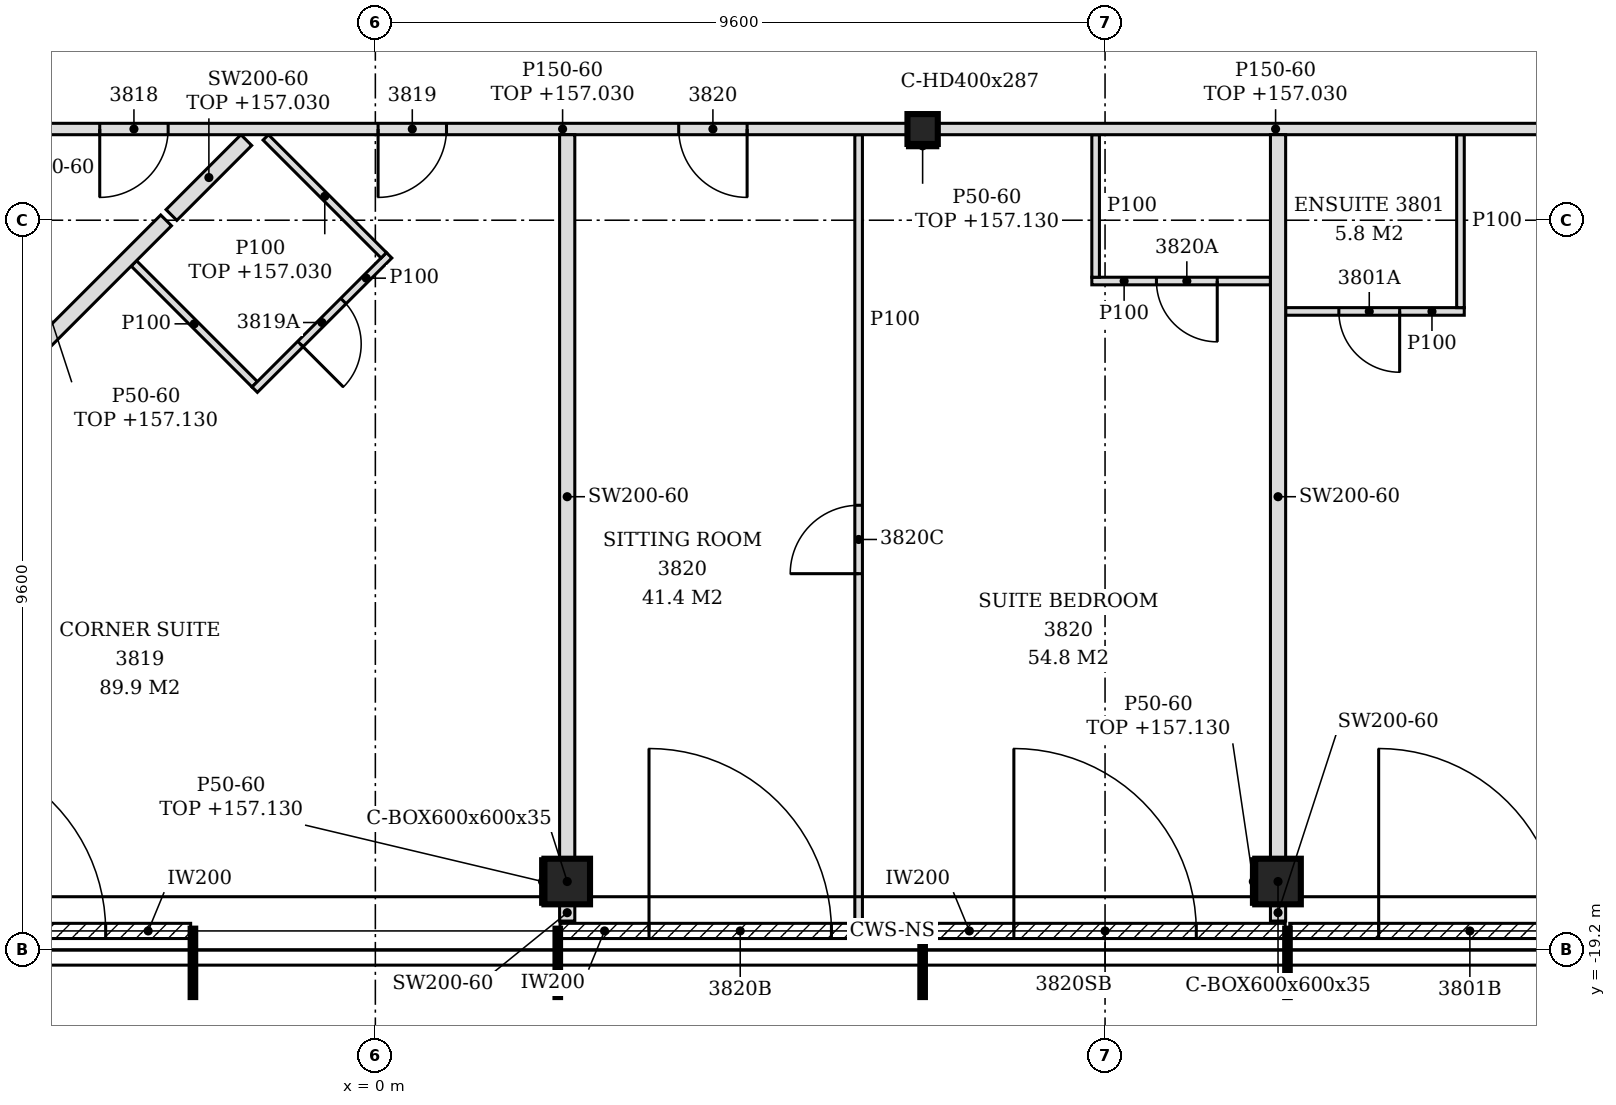
"""IFC4 building model, lengths in metres.
Left out: names, types, materials, properties, quantities, classifications, styles, units other than length and angle.
Written with IfcOpenShell. Run it as: python <this file> out.ifc"""

import sys

from ifc_helpers import new_model, si_unit, direction, frame, frame_2d, origin, origin_2d, place, context, subcontext, project, spatial, polyline, rectangle, hollow_rectangle, i_section, outline, extrude, element, fill, save


model = new_model("IFC4")
c1 = context("Model", 3, precision=1e-05, world=origin(), true_north=direction((0.0, 1.0)))
c2 = subcontext(c1, "Body", "Model", "MODEL_VIEW")
j1 = project(units=[si_unit("LENGTHUNIT", "METRE"), si_unit("PLANEANGLEUNIT", "RADIAN")], contexts=[c1])
p1 = place(None, origin())
s1 = spatial("IfcSite", under=j1, at=p1, CompositionType="ELEMENT")
p2 = place(p1, origin())
s2 = spatial("IfcBuilding", under=s1, at=p2, CompositionType="ELEMENT")
p3 = place(p2, frame((0.0, 0.0, 154.2)))
s3 = spatial("IfcBuildingStorey", under=s2, at=p3, CompositionType="ELEMENT", Elevation=154.2)
for number, where, z_axis, x_axis in (
    (1, (2.524, -18.3, -0.15), (0.0, 0.0, 1.0), (1.0, 0.0, 0.0)),
    (2, (11.876, -18.3, -0.15), (0.0, 0.0, 1.0), (1.0, 0.0, 0.0)),
):
    element("IfcColumn", number, at=place(p3, frame(where, z_axis=z_axis, x_axis=x_axis)), inside=s3, PredefinedType="COLUMN", context=c2, shape_type="SweptSolid", body=[
        extrude(hollow_rectangle(XDim=0.6, YDim=0.6, WallThickness=0.035, at=origin_2d()), origin(), (0.0, 0.0, 1.0), 3.6),
    ])
p4 = place(p3, frame((7.2, -8.4, -0.15), z_axis=(0.0, 0.0, 1.0), x_axis=(1.0, 0.0, 0.0)))
e3 = element("IfcColumn", 3, at=p4, inside=s3, PredefinedType="COLUMN", context=c2, shape_type="SweptSolid", body=[
    extrude(i_section(OverallWidth=0.399, OverallDepth=0.393, WebThickness=0.023, FlangeThickness=0.037, FilletRadius=0.015, at=origin_2d()), origin(), (0.0, 0.0, 1.0), 3.6),
])
p5 = place(p3, frame((-7.056, -18.95, 0.0), z_axis=(0.0, 0.0, 1.0), x_axis=(1.0, 0.0, 0.0)))
e4 = element("IfcWall", 4, at=p5, inside=s3, PredefinedType="NOTDEFINED", context=c2, shape_type="SweptSolid", body=[
    extrude(rectangle(XDim=4.626, YDim=0.2, at=frame_2d((2.313, 0.0))), origin(), (0.0, 0.0, 1.0), 3.45),
])
p6 = place(p5, frame((1.108, 0.0, 0.0)))
e5 = element("IfcOpeningElement", 5, at=p6, cuts=e4, PredefinedType="OPENING", context=c2, shape_type="SweptSolid", body=[
    extrude(rectangle(XDim=2.4, YDim=2.4, at=frame_2d((1.2, 1.2))), frame((0.0, 0.11, 0.0), z_axis=(0.0, -1.0, 0.0), x_axis=(1.0, 0.0, 0.0)), (0.0, 0.0, 1.0), 0.22),
])
p7 = place(p3, frame((2.43, -18.95, 0.0), z_axis=(0.0, 0.0, 1.0), x_axis=(1.0, 0.0, 0.0)))
e6 = element("IfcWall", 6, at=p7, inside=s3, PredefinedType="NOTDEFINED", context=c2, shape_type="SweptSolid", body=[
    extrude(rectangle(XDim=4.74, YDim=0.2, at=frame_2d((2.37, 0.0))), origin(), (0.0, 0.0, 1.0), 3.45),
])
p8 = place(p7, frame((1.17, 0.0, 0.0)))
e7 = element("IfcOpeningElement", 7, at=p8, cuts=e6, PredefinedType="OPENING", context=c2, shape_type="SweptSolid", body=[
    extrude(rectangle(XDim=2.4, YDim=2.4, at=frame_2d((1.2, 1.2))), frame((0.0, 0.11, 0.0), z_axis=(0.0, -1.0, 0.0), x_axis=(1.0, 0.0, 0.0)), (0.0, 0.0, 1.0), 0.22),
])
p9 = place(p3, frame((7.23, -18.95, 0.0), z_axis=(0.0, 0.0, 1.0), x_axis=(1.0, 0.0, 0.0)))
e8 = element("IfcWall", 8, at=p9, inside=s3, PredefinedType="NOTDEFINED", context=c2, shape_type="SweptSolid", body=[
    extrude(rectangle(XDim=4.74, YDim=0.2, at=frame_2d((2.37, 0.0))), origin(), (0.0, 0.0, 1.0), 3.45),
])
p10 = place(p9, frame((1.17, 0.0, 0.0)))
e9 = element("IfcOpeningElement", 9, at=p10, cuts=e8, PredefinedType="OPENING", context=c2, shape_type="SweptSolid", body=[
    extrude(rectangle(XDim=2.4, YDim=2.4, at=frame_2d((1.2, 1.2))), frame((0.0, 0.11, 0.0), z_axis=(0.0, -1.0, 0.0), x_axis=(1.0, 0.0, 0.0)), (0.0, 0.0, 1.0), 0.22),
])
p11 = place(p3, frame((12.03, -18.95, 0.0), z_axis=(0.0, 0.0, 1.0), x_axis=(1.0, 0.0, 0.0)))
e10 = element("IfcWall", 10, at=p11, inside=s3, PredefinedType="NOTDEFINED", context=c2, shape_type="SweptSolid", body=[
    extrude(rectangle(XDim=4.74, YDim=0.2, at=frame_2d((2.37, 0.0))), origin(), (0.0, 0.0, 1.0), 3.45),
])
p12 = place(p11, frame((1.17, 0.0, 0.0)))
e11 = element("IfcOpeningElement", 11, at=p12, cuts=e10, PredefinedType="OPENING", context=c2, shape_type="SweptSolid", body=[
    extrude(rectangle(XDim=2.4, YDim=2.4, at=frame_2d((1.2, 1.2))), frame((0.0, 0.11, 0.0), z_axis=(0.0, -1.0, 0.0), x_axis=(1.0, 0.0, 0.0)), (0.0, 0.0, 1.0), 0.22),
])
p13 = place(p3, frame((2.524, -18.82, 0.0), z_axis=(0.0, 0.0, 1.0), x_axis=(0.0, 1.0, 0.0)))
e12 = element("IfcWall", 12, at=p13, inside=s3, PredefinedType="PARTITIONING", context=c2, shape_type="SweptSolid", body=[
    extrude(rectangle(XDim=0.22, YDim=0.2, at=frame_2d((0.11, 0.0))), origin(), (0.0, 0.0, 1.0), 3.45),
])
p14 = place(p3, frame((6.358, -18.82, 0.0), z_axis=(0.0, 0.0, 1.0), x_axis=(0.0, 1.0, 0.0)))
e13 = element("IfcWall", 13, at=p14, inside=s3, PredefinedType="PARTITIONING", context=c2, shape_type="SweptSolid", body=[
    extrude(outline(polyline([(0.0, 0.0), (10.345, 0.0), (10.345, 2.83), (10.27, 2.83), (10.268, 3.45), (4.525, 3.45), (4.523, 2.88), (4.315, 2.88), (4.313, 3.45), (0.67, 3.45), (0.668, 2.93), (0.37, 2.93), (0.368, 3.45), (0.0, 3.45), (0.0, 0.0)])), frame((0.0, 0.05, 0.0), z_axis=(0.0, -1.0, 0.0), x_axis=(1.0, 0.0, 0.0)), (0.0, 0.0, 1.0), 0.1),
])
p15 = place(p14, frame((4.57, 0.0, 0.0)))
e14 = element("IfcOpeningElement", 14, at=p15, cuts=e13, PredefinedType="OPENING", context=c2, shape_type="SweptSolid", body=[
    extrude(rectangle(XDim=0.9, YDim=2.1, at=frame_2d((0.45, 1.05))), frame((0.0, 0.06, 0.0), z_axis=(0.0, -1.0, 0.0), x_axis=(1.0, 0.0, 0.0)), (0.0, 0.0, 1.0), 0.12),
])
p16 = place(p3, frame((11.876, -18.82, 0.0), z_axis=(0.0, 0.0, 1.0), x_axis=(0.0, 1.0, 0.0)))
e15 = element("IfcWall", 15, at=p16, inside=s3, PredefinedType="PARTITIONING", context=c2, shape_type="SweptSolid", body=[
    extrude(rectangle(XDim=0.22, YDim=0.2, at=frame_2d((0.11, 0.0))), origin(), (0.0, 0.0, 1.0), 3.45),
])
for number, where, z_axis, x_axis in (
    (16, (2.524, -18.0, 0.0), (0.0, 0.0, 1.0), (0.0, 1.0, 0.0)),
    (17, (11.876, -18.0, 0.0), (0.0, 0.0, 1.0), (0.0, 1.0, 0.0)),
):
    element("IfcWall", number, at=place(p3, frame(where, z_axis=z_axis, x_axis=x_axis)), inside=s3, PredefinedType="PARTITIONING", context=c2, shape_type="SweptSolid", body=[
        extrude(outline(polyline([(0.0, 0.0), (9.525, 0.0), (9.525, 2.83), (9.45, 2.83), (9.448, 3.45), (3.705, 3.45), (3.703, 2.88), (3.495, 2.88), (3.493, 3.45), (0.0, 3.45), (0.0, 0.0)])), frame((0.0, 0.1, 0.0), z_axis=(0.0, -1.0, 0.0), x_axis=(1.0, 0.0, 0.0)), (0.0, 0.0, 1.0), 0.2),
    ])
p17 = place(p3, frame((-9.507, -16.355, 0.0), z_axis=(0.0, 0.0, 1.0), x_axis=(0.707170680804, 0.707042875794, 0.0)))
e18 = element("IfcWall", 18, at=p17, inside=s3, PredefinedType="PARTITIONING", context=c2, shape_type="SweptSolid", body=[
    extrude(rectangle(XDim=9.551, YDim=0.2, at=frame_2d((4.776, 0.0))), origin(), (0.0, 0.0, 1.0), 2.93),
])
p18 = place(p3, frame((-1.587, -11.759, 0.0), z_axis=(0.0, 0.0, 1.0), x_axis=(-0.706889644159, 0.707323851557, 0.0)))
e19 = element("IfcWall", 19, at=p18, inside=s3, PredefinedType="PARTITIONING", context=c2, shape_type="SweptSolid", body=[
    extrude(rectangle(XDim=2.249, YDim=0.1, at=frame_2d((1.125, 0.0))), origin(), (0.0, 0.0, 1.0), 3.45),
])
p19 = place(p3, frame((-1.587, -11.829, 0.0), z_axis=(0.0, 0.0, 1.0), x_axis=(0.707350821469, 0.706862656651, 0.0)))
e20 = element("IfcWall", 20, at=p19, inside=s3, PredefinedType="PARTITIONING", context=c2, shape_type="SweptSolid", body=[
    extrude(rectangle(XDim=2.5, YDim=0.1, at=frame_2d((1.25, 0.0))), origin(), (0.0, 0.0, 1.0), 3.45),
])
p20 = place(p19, frame((0.85, 0.0, 0.0)))
e21 = element("IfcOpeningElement", 21, at=p20, cuts=e20, PredefinedType="OPENING", context=c2, shape_type="SweptSolid", body=[
    extrude(rectangle(XDim=0.8, YDim=2.1, at=frame_2d((0.4, 1.05))), frame((0.0, 0.06, 0.0), z_axis=(0.0, -1.0, 0.0), x_axis=(1.0, 0.0, 0.0)), (0.0, 0.0, 1.0), 0.12),
])
p21 = place(p3, frame((11.976, -10.8, 0.0), z_axis=(0.0, 0.0, 1.0), x_axis=(1.0, 0.0, 0.0)))
e22 = element("IfcWall", 22, at=p21, inside=s3, PredefinedType="PARTITIONING", context=c2, shape_type="SweptSolid", body=[
    extrude(rectangle(XDim=2.35, YDim=0.1, at=frame_2d((1.175, 0.0))), origin(), (0.0, 0.0, 1.0), 3.45),
])
p22 = place(p21, frame((0.7, 0.0, 0.0)))
e23 = element("IfcOpeningElement", 23, at=p22, cuts=e22, PredefinedType="OPENING", context=c2, shape_type="SweptSolid", body=[
    extrude(rectangle(XDim=0.8, YDim=2.1, at=frame_2d((0.4, 1.05))), frame((0.0, 0.06, 0.0), z_axis=(0.0, -1.0, 0.0), x_axis=(1.0, 0.0, 0.0)), (0.0, 0.0, 1.0), 0.12),
])
p23 = place(p3, frame((14.276, -10.75, 0.0), z_axis=(0.0, 0.0, 1.0), x_axis=(0.0, 1.0, 0.0)))
e24 = element("IfcWall", 24, at=p23, inside=s3, PredefinedType="PARTITIONING", context=c2, shape_type="SweptSolid", body=[
    extrude(outline(polyline([(0.0, 0.0), (2.275, 0.0), (2.275, 2.83), (2.2, 2.83), (2.198, 3.45), (0.0, 3.45), (0.0, 0.0)])), frame((0.0, 0.05, 0.0), z_axis=(0.0, -1.0, 0.0), x_axis=(1.0, 0.0, 0.0)), (0.0, 0.0, 1.0), 0.1),
])
p24 = place(p3, frame((9.426, -10.4, 0.0), z_axis=(0.0, 0.0, 1.0), x_axis=(1.0, 0.0, 0.0)))
e25 = element("IfcWall", 25, at=p24, inside=s3, PredefinedType="PARTITIONING", context=c2, shape_type="SweptSolid", body=[
    extrude(rectangle(XDim=2.35, YDim=0.1, at=frame_2d((1.175, 0.0))), origin(), (0.0, 0.0, 1.0), 3.45),
])
p25 = place(p24, frame((0.85, 0.0, 0.0)))
e26 = element("IfcOpeningElement", 26, at=p25, cuts=e25, PredefinedType="OPENING", context=c2, shape_type="SweptSolid", body=[
    extrude(rectangle(XDim=0.8, YDim=2.1, at=frame_2d((0.4, 1.05))), frame((0.0, 0.06, 0.0), z_axis=(0.0, -1.0, 0.0), x_axis=(1.0, 0.0, 0.0)), (0.0, 0.0, 1.0), 0.12),
])
p26 = place(p3, frame((9.476, -10.35, 0.0), z_axis=(0.0, 0.0, 1.0), x_axis=(0.0, 1.0, 0.0)))
e27 = element("IfcWall", 27, at=p26, inside=s3, PredefinedType="PARTITIONING", context=c2, shape_type="SweptSolid", body=[
    extrude(outline(polyline([(0.0, 0.0), (1.875, 0.0), (1.875, 2.83), (1.8, 2.83), (1.798, 3.45), (0.0, 3.45), (0.0, 0.0)])), frame((0.0, 0.05, 0.0), z_axis=(0.0, -1.0, 0.0), x_axis=(1.0, 0.0, 0.0)), (0.0, 0.0, 1.0), 0.1),
])
p27 = place(p3, frame((0.111, -10.062, 0.0), z_axis=(0.0, 0.0, 1.0), x_axis=(-0.70732924673, 0.706884245631, 0.0)))
e28 = element("IfcWall", 28, at=p27, inside=s3, PredefinedType="PARTITIONING", context=c2, shape_type="SweptSolid", body=[
    extrude(rectangle(XDim=2.195, YDim=0.1, at=frame_2d((1.097, 0.0))), origin(), (0.0, 0.0, 1.0), 2.83),
])
p28 = place(p3, frame((-2.683, -9.531, 0.0), z_axis=(0.0, 0.0, 1.0), x_axis=(0.707019164958, 0.70719438656, 0.0)))
e29 = element("IfcWall", 29, at=p28, inside=s3, PredefinedType="PARTITIONING", context=c2, shape_type="SweptSolid", body=[
    extrude(rectangle(XDim=1.393, YDim=0.2, at=frame_2d((0.697, 0.0))), origin(), (0.0, 0.0, 1.0), 2.83),
])
p29 = place(p3, frame((-4.601, -8.4, 0.0), z_axis=(0.0, 0.0, 1.0), x_axis=(1.0, 0.0, 0.0)))
e30 = element("IfcWall", 30, at=p29, inside=s3, PredefinedType="PARTITIONING", context=c2, shape_type="SweptSolid", body=[
    extrude(rectangle(XDim=11.601, YDim=0.15, at=frame_2d((5.801, 0.0))), origin(), (0.0, 0.0, 1.0), 2.83),
])
p30 = place(p29, frame((0.974, 0.0, 0.0)))
e31 = element("IfcOpeningElement", 31, at=p30, cuts=e30, PredefinedType="OPENING", context=c2, shape_type="SweptSolid", body=[
    extrude(rectangle(XDim=0.9, YDim=2.1, at=frame_2d((0.45, 1.05))), frame((0.0, 0.085, 0.0), z_axis=(0.0, -1.0, 0.0), x_axis=(1.0, 0.0, 0.0)), (0.0, 0.0, 1.0), 0.17),
])
p31 = place(p29, frame((4.636, 0.0, 0.0)))
e32 = element("IfcOpeningElement", 32, at=p31, cuts=e30, PredefinedType="OPENING", context=c2, shape_type="SweptSolid", body=[
    extrude(rectangle(XDim=0.9, YDim=2.1, at=frame_2d((0.45, 1.05))), frame((0.0, 0.085, 0.0), z_axis=(0.0, -1.0, 0.0), x_axis=(1.0, 0.0, 0.0)), (0.0, 0.0, 1.0), 0.17),
])
p32 = place(p29, frame((8.592, 0.0, 0.0)))
e33 = element("IfcOpeningElement", 33, at=p32, cuts=e30, PredefinedType="OPENING", context=c2, shape_type="SweptSolid", body=[
    extrude(rectangle(XDim=0.9, YDim=2.1, at=frame_2d((0.45, 1.05))), frame((0.0, 0.085, 0.0), z_axis=(0.0, -1.0, 0.0), x_axis=(1.0, 0.0, 0.0)), (0.0, 0.0, 1.0), 0.17),
])
p33 = place(p3, frame((7.399, -8.4, 0.0), z_axis=(0.0, 0.0, 1.0), x_axis=(1.0, 0.0, 0.0)))
e34 = element("IfcWall", 34, at=p33, inside=s3, PredefinedType="PARTITIONING", context=c2, shape_type="SweptSolid", body=[
    extrude(rectangle(XDim=11.601, YDim=0.15, at=frame_2d((5.801, 0.0))), origin(), (0.0, 0.0, 1.0), 2.83),
])
p34 = place(p33, frame((8.888, 0.0, 0.0)))
e35 = element("IfcOpeningElement", 35, at=p34, cuts=e34, PredefinedType="OPENING", context=c2, shape_type="SweptSolid", body=[
    extrude(rectangle(XDim=0.9, YDim=2.1, at=frame_2d((0.45, 1.05))), frame((0.0, 0.085, 0.0), z_axis=(0.0, -1.0, 0.0), x_axis=(1.0, 0.0, 0.0)), (0.0, 0.0, 1.0), 0.17),
])
for number, where, z_axis, x_axis in (
    (36, (2.199, -18.6, 0.0), (0.0, 0.0, 1.0), (0.0, 1.0, 0.0)),
    (37, (11.551, -18.6, 0.0), (0.0, 0.0, 1.0), (0.0, 1.0, 0.0)),
):
    element("IfcWall", number, at=place(p3, frame(where, z_axis=z_axis, x_axis=x_axis)), inside=s3, PredefinedType="PARTITIONING", context=c2, shape_type="SweptSolid", body=[
        extrude(rectangle(XDim=0.6, YDim=0.05, at=frame_2d((0.3, 0.0))), origin(), (0.0, 0.0, 1.0), 2.93),
    ])
p35 = place(p3, frame((7.0, -8.622, 0.0), z_axis=(0.0, 0.0, 1.0), x_axis=(1.0, 0.0, 0.0)))
e38 = element("IfcWall", 38, at=p35, inside=s3, PredefinedType="PARTITIONING", context=c2, shape_type="SweptSolid", body=[
    extrude(rectangle(XDim=0.399, YDim=0.05, at=frame_2d((0.199, 0.0))), origin(), (0.0, 0.0, 1.0), 2.93),
])
p36 = place(p6, origin())
e39 = element("IfcDoor", 39, at=p36, inside=s3, OperationType="SINGLE_SWING_LEFT", PredefinedType="DOOR", context=c2, shape_type="SweptSolid", body=[
    extrude(rectangle(XDim=2.4, YDim=2.4, at=frame_2d((1.2, 1.2))), frame((0.0, 0.025, 0.0), z_axis=(0.0, -1.0, 0.0), x_axis=(1.0, 0.0, 0.0)), (0.0, 0.0, 1.0), 0.05),
])
fill(e5, e39)
p37 = place(p8, origin())
e40 = element("IfcDoor", 40, at=p37, inside=s3, OperationType="SINGLE_SWING_LEFT", PredefinedType="DOOR", context=c2, shape_type="SweptSolid", body=[
    extrude(rectangle(XDim=2.4, YDim=2.4, at=frame_2d((1.2, 1.2))), frame((0.0, 0.025, 0.0), z_axis=(0.0, -1.0, 0.0), x_axis=(1.0, 0.0, 0.0)), (0.0, 0.0, 1.0), 0.05),
])
fill(e7, e40)
p38 = place(p10, origin())
e41 = element("IfcDoor", 41, at=p38, inside=s3, OperationType="SINGLE_SWING_LEFT", PredefinedType="DOOR", context=c2, shape_type="SweptSolid", body=[
    extrude(rectangle(XDim=2.4, YDim=2.4, at=frame_2d((1.2, 1.2))), frame((0.0, 0.025, 0.0), z_axis=(0.0, -1.0, 0.0), x_axis=(1.0, 0.0, 0.0)), (0.0, 0.0, 1.0), 0.05),
])
fill(e9, e41)
p39 = place(p12, origin())
e42 = element("IfcDoor", 42, at=p39, inside=s3, OperationType="SINGLE_SWING_LEFT", PredefinedType="DOOR", context=c2, shape_type="SweptSolid", body=[
    extrude(rectangle(XDim=2.4, YDim=2.4, at=frame_2d((1.2, 1.2))), frame((0.0, 0.025, 0.0), z_axis=(0.0, -1.0, 0.0), x_axis=(1.0, 0.0, 0.0)), (0.0, 0.0, 1.0), 0.05),
])
fill(e11, e42)
p40 = place(p22, frame((0.8, 0.0, 0.0), z_axis=(0.0, 0.0, 1.0), x_axis=(-1.0, 0.0, 0.0)))
e43 = element("IfcDoor", 43, at=p40, inside=s3, OperationType="SINGLE_SWING_LEFT", PredefinedType="DOOR", context=c2, shape_type="SweptSolid", body=[
    extrude(rectangle(XDim=0.8, YDim=2.1, at=frame_2d((0.4, 1.05))), frame((0.0, 0.025, 0.0), z_axis=(0.0, -1.0, 0.0), x_axis=(1.0, 0.0, 0.0)), (0.0, 0.0, 1.0), 0.05),
])
fill(e23, e43)
p41 = place(p30, frame((0.9, 0.0, 0.0), z_axis=(0.0, 0.0, 1.0), x_axis=(-1.0, 0.0, 0.0)))
e44 = element("IfcDoor", 44, at=p41, inside=s3, OperationType="SINGLE_SWING_RIGHT", PredefinedType="DOOR", context=c2, shape_type="SweptSolid", body=[
    extrude(rectangle(XDim=0.9, YDim=2.1, at=frame_2d((0.45, 1.05))), frame((0.0, 0.025, 0.0), z_axis=(0.0, -1.0, 0.0), x_axis=(1.0, 0.0, 0.0)), (0.0, 0.0, 1.0), 0.05),
])
fill(e31, e44)
p42 = place(p31, frame((0.9, 0.0, 0.0), z_axis=(0.0, 0.0, 1.0), x_axis=(-1.0, 0.0, 0.0)))
e45 = element("IfcDoor", 45, at=p42, inside=s3, OperationType="SINGLE_SWING_RIGHT", PredefinedType="DOOR", context=c2, shape_type="SweptSolid", body=[
    extrude(rectangle(XDim=0.9, YDim=2.1, at=frame_2d((0.45, 1.05))), frame((0.0, 0.025, 0.0), z_axis=(0.0, -1.0, 0.0), x_axis=(1.0, 0.0, 0.0)), (0.0, 0.0, 1.0), 0.05),
])
fill(e32, e45)
p43 = place(p20, frame((0.8, 0.0, 0.0), z_axis=(0.0, 0.0, 1.0), x_axis=(-1.0, 0.0, 0.0)))
e46 = element("IfcDoor", 46, at=p43, inside=s3, OperationType="SINGLE_SWING_RIGHT", PredefinedType="DOOR", context=c2, shape_type="SweptSolid", body=[
    extrude(rectangle(XDim=0.8, YDim=2.1, at=frame_2d((0.4, 1.05))), frame((0.0, 0.025, 0.0), z_axis=(0.0, -1.0, 0.0), x_axis=(1.0, 0.0, 0.0)), (0.0, 0.0, 1.0), 0.05),
])
fill(e21, e46)
p44 = place(p32, frame((0.9, 0.0, 0.0), z_axis=(0.0, 0.0, 1.0), x_axis=(-1.0, 0.0, 0.0)))
e47 = element("IfcDoor", 47, at=p44, inside=s3, OperationType="SINGLE_SWING_LEFT", PredefinedType="DOOR", context=c2, shape_type="SweptSolid", body=[
    extrude(rectangle(XDim=0.9, YDim=2.1, at=frame_2d((0.45, 1.05))), frame((0.0, 0.025, 0.0), z_axis=(0.0, -1.0, 0.0), x_axis=(1.0, 0.0, 0.0)), (0.0, 0.0, 1.0), 0.05),
])
fill(e33, e47)
p45 = place(p15, origin())
e48 = element("IfcDoor", 48, at=p45, inside=s3, OperationType="SINGLE_SWING_LEFT", PredefinedType="DOOR", context=c2, shape_type="SweptSolid", body=[
    extrude(rectangle(XDim=0.9, YDim=2.1, at=frame_2d((0.45, 1.05))), frame((0.0, 0.025, 0.0), z_axis=(0.0, -1.0, 0.0), x_axis=(1.0, 0.0, 0.0)), (0.0, 0.0, 1.0), 0.05),
])
fill(e14, e48)
p46 = place(p25, frame((0.8, 0.0, 0.0), z_axis=(0.0, 0.0, 1.0), x_axis=(-1.0, 0.0, 0.0)))
e49 = element("IfcDoor", 49, at=p46, inside=s3, OperationType="SINGLE_SWING_LEFT", PredefinedType="DOOR", context=c2, shape_type="SweptSolid", body=[
    extrude(rectangle(XDim=0.8, YDim=2.1, at=frame_2d((0.4, 1.05))), frame((0.0, 0.025, 0.0), z_axis=(0.0, -1.0, 0.0), x_axis=(1.0, 0.0, 0.0)), (0.0, 0.0, 1.0), 0.05),
])
fill(e26, e49)
save(model, sys.argv[1])
